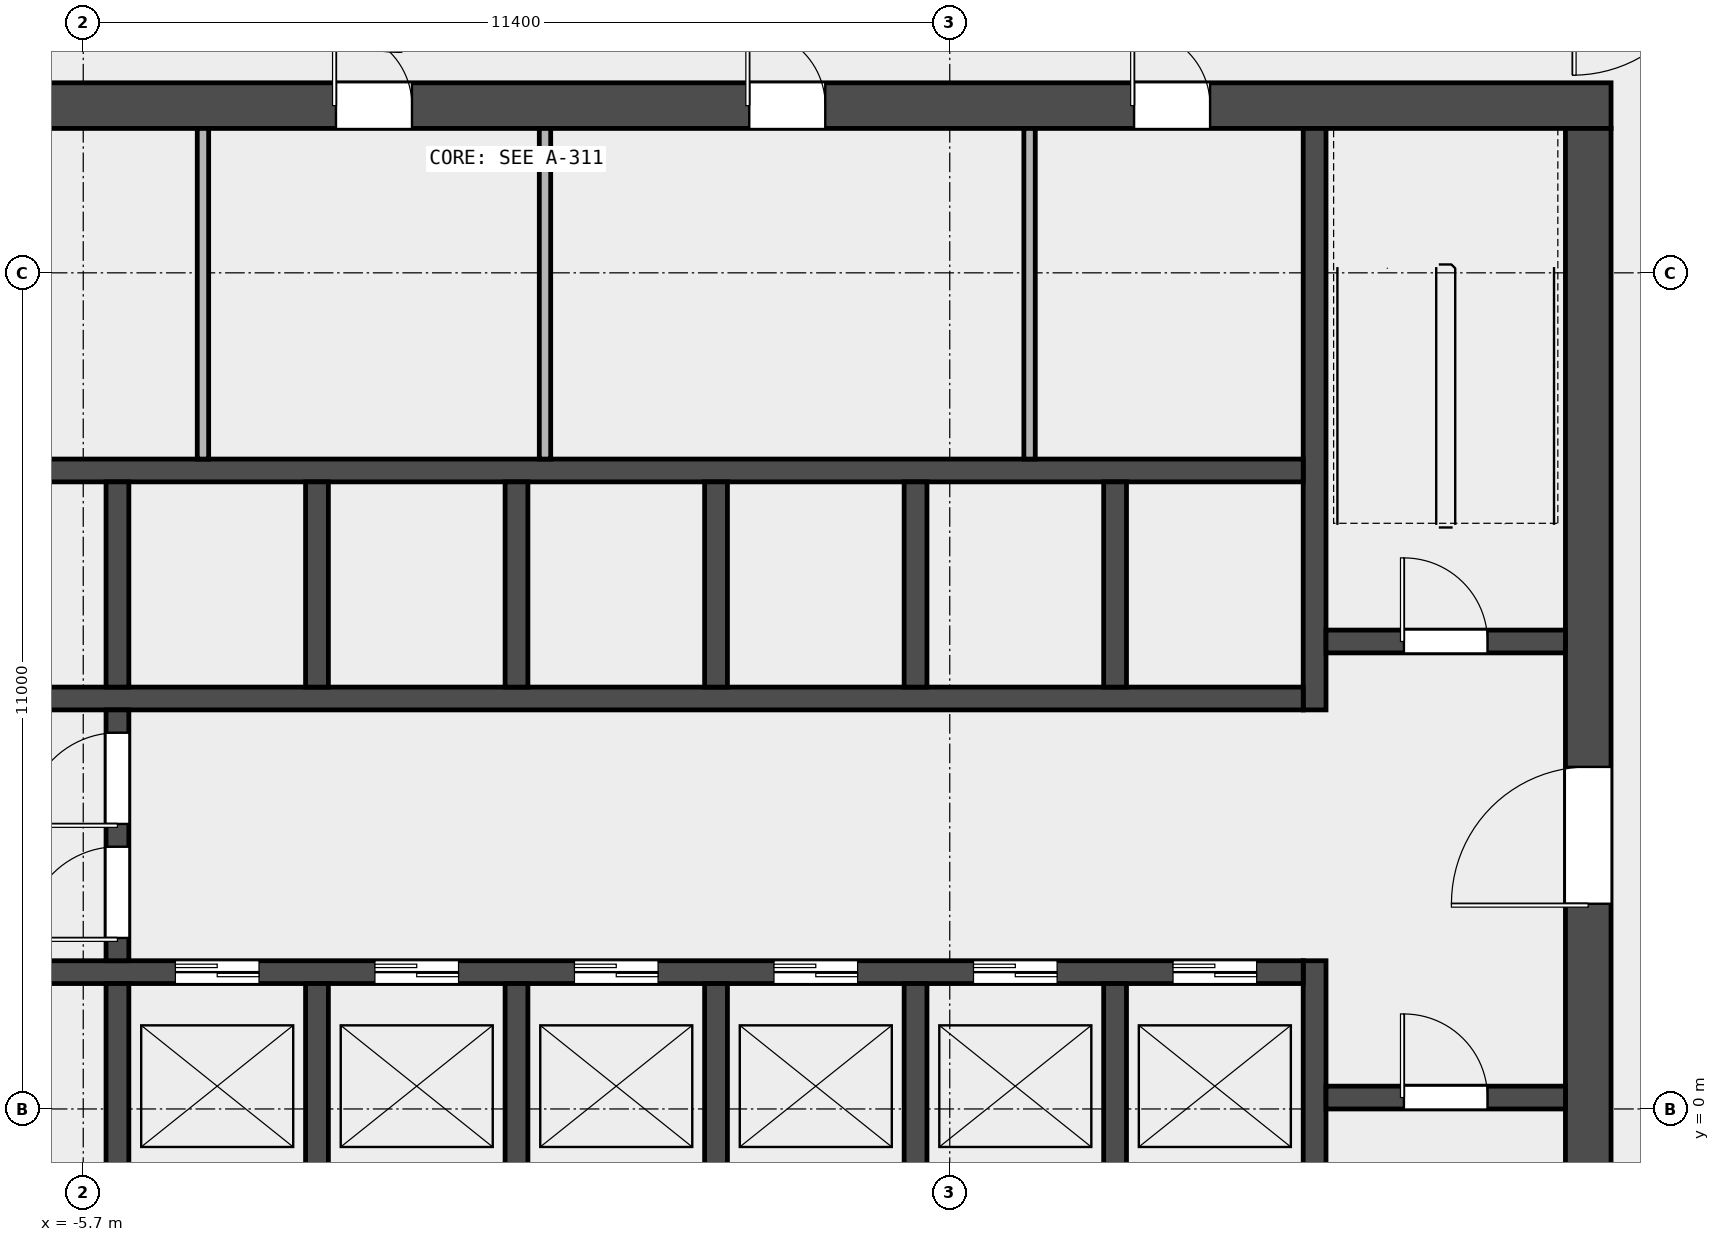
"""IFC4 building model, lengths in metres.
Left out: names, types, materials, properties, quantities, classifications, styles, units other than length and angle.
Written with IfcOpenShell. Run it as: python <this file> out.ifc"""

import sys

from ifc_helpers import new_model, si_unit, direction, frame, frame_2d, origin, place, context, subcontext, project, spatial, rectangle, extrude, element, fill, save


model = new_model("IFC4")
c1 = context("Model", 3, precision=1e-05, world=origin(), true_north=direction((0.0, 1.0)))
c2 = subcontext(c1, "Body", "Model", "MODEL_VIEW")
j1 = project(units=[si_unit("LENGTHUNIT", "METRE"), si_unit("PLANEANGLEUNIT", "RADIAN")], contexts=[c1])
p1 = place(None, origin())
s1 = spatial("IfcSite", under=j1, at=p1, CompositionType="ELEMENT")
p2 = place(p1, origin())
s2 = spatial("IfcBuilding", under=s1, at=p2, CompositionType="ELEMENT")
p3 = place(p2, frame((0.0, 0.0, 126.1)))
s3 = spatial("IfcBuildingStorey", under=s2, at=p3, CompositionType="ELEMENT", Elevation=126.1)
p4 = place(p3, frame((-14.4, 13.2, 0.0), z_axis=(0.0, 0.0, 1.0), x_axis=(1.0, 0.0, 0.0)))
e1 = element("IfcWall", 1, at=p4, inside=s3, PredefinedType="SHEAR", context=c2, shape_type="SweptSolid", body=[
    extrude(rectangle(XDim=28.8, YDim=0.6, at=frame_2d((14.4, 0.0))), origin(), (0.0, 0.0, 1.0), 4.2),
])
p5 = place(p4, frame((6.587, 0.0, 0.0)))
e2 = element("IfcOpeningElement", 2, at=p5, cuts=e1, PredefinedType="OPENING", context=c2, shape_type="SweptSolid", body=[
    extrude(rectangle(XDim=1.0, YDim=2.1, at=frame_2d((0.5, 1.05))), frame((0.0, 0.312, 0.0), z_axis=(0.0, -1.0, 0.0), x_axis=(1.0, 0.0, 0.0)), (0.0, 0.0, 1.0), 0.624),
])
p6 = place(p4, frame((12.025, 0.0, 0.0)))
e3 = element("IfcOpeningElement", 3, at=p6, cuts=e1, PredefinedType="OPENING", context=c2, shape_type="SweptSolid", body=[
    extrude(rectangle(XDim=1.0, YDim=2.1, at=frame_2d((0.5, 1.05))), frame((0.0, 0.312, 0.0), z_axis=(0.0, -1.0, 0.0), x_axis=(1.0, 0.0, 0.0)), (0.0, 0.0, 1.0), 0.624),
])
p7 = place(p4, frame((17.462, 0.0, 0.0)))
e4 = element("IfcOpeningElement", 4, at=p7, cuts=e1, PredefinedType="OPENING", context=c2, shape_type="SweptSolid", body=[
    extrude(rectangle(XDim=1.0, YDim=2.1, at=frame_2d((0.5, 1.05))), frame((0.0, 0.312, 0.0), z_axis=(0.0, -1.0, 0.0), x_axis=(1.0, 0.0, 0.0)), (0.0, 0.0, 1.0), 0.624),
])
p8 = place(p4, frame((22.525, 0.0, 0.0)))
e5 = element("IfcOpeningElement", 5, at=p8, cuts=e1, PredefinedType="OPENING", context=c2, shape_type="SweptSolid", body=[
    extrude(rectangle(XDim=1.0, YDim=2.1, at=frame_2d((0.5, 1.05))), frame((0.0, 0.312, 0.0), z_axis=(0.0, -1.0, 0.0), x_axis=(1.0, 0.0, 0.0)), (0.0, 0.0, 1.0), 0.624),
])
p9 = place(p3, frame((14.1, -6.6, 0.0), z_axis=(0.0, 0.0, 1.0), x_axis=(0.0, 1.0, 0.0)))
e6 = element("IfcWall", 6, at=p9, inside=s3, PredefinedType="SHEAR", context=c2, shape_type="SweptSolid", body=[
    extrude(rectangle(XDim=19.5, YDim=0.6, at=frame_2d((9.75, 0.0))), origin(), (0.0, 0.0, 1.0), 4.2),
])
p10 = place(p9, frame((9.3, 0.0, 0.0)))
e7 = element("IfcOpeningElement", 7, at=p10, cuts=e6, PredefinedType="OPENING", context=c2, shape_type="SweptSolid", body=[
    extrude(rectangle(XDim=1.8, YDim=2.1, at=frame_2d((0.9, 1.05))), frame((0.0, 0.312, 0.0), z_axis=(0.0, -1.0, 0.0), x_axis=(1.0, 0.0, 0.0)), (0.0, 0.0, 1.0), 0.624),
])
p11 = place(p3, frame((10.5, -6.6, 0.0), z_axis=(0.0, 0.0, 1.0), x_axis=(0.0, 1.0, 0.0)))
e8 = element("IfcWall", 8, at=p11, inside=s3, PredefinedType="SHEAR", context=c2, shape_type="SweptSolid", body=[
    extrude(rectangle(XDim=8.55, YDim=0.3, at=frame_2d((4.275, 0.0))), origin(), (0.0, 0.0, 1.0), 4.2),
])
p12 = place(p3, frame((10.5, 5.25, 0.0), z_axis=(0.0, 0.0, 1.0), x_axis=(0.0, 1.0, 0.0)))
e9 = element("IfcWall", 9, at=p12, inside=s3, PredefinedType="SHEAR", context=c2, shape_type="SweptSolid", body=[
    extrude(rectangle(XDim=7.65, YDim=0.3, at=frame_2d((3.825, 0.0))), origin(), (0.0, 0.0, 1.0), 4.2),
])
p13 = place(p3, frame((10.65, 0.15, 0.0), z_axis=(0.0, 0.0, 1.0), x_axis=(1.0, 0.0, 0.0)))
e10 = element("IfcWall", 10, at=p13, inside=s3, PredefinedType="SOLIDWALL", context=c2, shape_type="SweptSolid", body=[
    extrude(rectangle(XDim=3.15, YDim=0.3, at=frame_2d((1.575, 0.0))), origin(), (0.0, 0.0, 1.0), 4.2),
])
p14 = place(p13, frame((1.025, 0.0, 0.0)))
e11 = element("IfcOpeningElement", 11, at=p14, cuts=e10, PredefinedType="OPENING", context=c2, shape_type="SweptSolid", body=[
    extrude(rectangle(XDim=1.1, YDim=2.1, at=frame_2d((0.55, 1.05))), frame((0.0, 0.162, 0.0), z_axis=(0.0, -1.0, 0.0), x_axis=(1.0, 0.0, 0.0)), (0.0, 0.0, 1.0), 0.324),
])
p15 = place(p3, frame((10.65, 6.15, 0.0), z_axis=(0.0, 0.0, 1.0), x_axis=(1.0, 0.0, 0.0)))
e12 = element("IfcWall", 12, at=p15, inside=s3, PredefinedType="SOLIDWALL", context=c2, shape_type="SweptSolid", body=[
    extrude(rectangle(XDim=3.15, YDim=0.3, at=frame_2d((1.575, 0.0))), origin(), (0.0, 0.0, 1.0), 4.2),
])
p16 = place(p15, frame((1.025, 0.0, 0.0)))
e13 = element("IfcOpeningElement", 13, at=p16, cuts=e12, PredefinedType="OPENING", context=c2, shape_type="SweptSolid", body=[
    extrude(rectangle(XDim=1.1, YDim=2.1, at=frame_2d((0.55, 1.05))), frame((0.0, 0.162, 0.0), z_axis=(0.0, -1.0, 0.0), x_axis=(1.0, 0.0, 0.0)), (0.0, 0.0, 1.0), 0.324),
])
p17 = place(p3, frame((-10.35, 1.8, 0.0), z_axis=(0.0, 0.0, 1.0), x_axis=(1.0, 0.0, 0.0)))
e14 = element("IfcWall", 14, at=p17, inside=s3, PredefinedType="SOLIDWALL", context=c2, shape_type="SweptSolid", body=[
    extrude(rectangle(XDim=20.7, YDim=0.3, at=frame_2d((10.35, 0.0))), origin(), (0.0, 0.0, 1.0), 4.2),
])
p18 = place(p17, frame((0.512, 0.0, 0.0)))
e15 = element("IfcOpeningElement", 15, at=p18, cuts=e14, PredefinedType="OPENING", context=c2, shape_type="SweptSolid", body=[
    extrude(rectangle(XDim=1.3, YDim=2.1, at=frame_2d((0.65, 1.05))), frame((0.0, 0.162, 0.0), z_axis=(0.0, -1.0, 0.0), x_axis=(1.0, 0.0, 0.0)), (0.0, 0.0, 1.0), 0.324),
])
p19 = place(p17, frame((5.863, 0.0, 0.0)))
e16 = element("IfcOpeningElement", 16, at=p19, cuts=e14, PredefinedType="OPENING", context=c2, shape_type="SweptSolid", body=[
    extrude(rectangle(XDim=1.1, YDim=2.1, at=frame_2d((0.55, 1.05))), frame((0.0, 0.162, 0.0), z_axis=(0.0, -1.0, 0.0), x_axis=(1.0, 0.0, 0.0)), (0.0, 0.0, 1.0), 0.324),
])
p20 = place(p17, frame((8.488, 0.0, 0.0)))
e17 = element("IfcOpeningElement", 17, at=p20, cuts=e14, PredefinedType="OPENING", context=c2, shape_type="SweptSolid", body=[
    extrude(rectangle(XDim=1.1, YDim=2.1, at=frame_2d((0.55, 1.05))), frame((0.0, 0.162, 0.0), z_axis=(0.0, -1.0, 0.0), x_axis=(1.0, 0.0, 0.0)), (0.0, 0.0, 1.0), 0.324),
])
p21 = place(p17, frame((11.113, 0.0, 0.0)))
e18 = element("IfcOpeningElement", 18, at=p21, cuts=e14, PredefinedType="OPENING", context=c2, shape_type="SweptSolid", body=[
    extrude(rectangle(XDim=1.1, YDim=2.1, at=frame_2d((0.55, 1.05))), frame((0.0, 0.162, 0.0), z_axis=(0.0, -1.0, 0.0), x_axis=(1.0, 0.0, 0.0)), (0.0, 0.0, 1.0), 0.324),
])
p22 = place(p17, frame((13.738, 0.0, 0.0)))
e19 = element("IfcOpeningElement", 19, at=p22, cuts=e14, PredefinedType="OPENING", context=c2, shape_type="SweptSolid", body=[
    extrude(rectangle(XDim=1.1, YDim=2.1, at=frame_2d((0.55, 1.05))), frame((0.0, 0.162, 0.0), z_axis=(0.0, -1.0, 0.0), x_axis=(1.0, 0.0, 0.0)), (0.0, 0.0, 1.0), 0.324),
])
p23 = place(p17, frame((16.363, 0.0, 0.0)))
e20 = element("IfcOpeningElement", 20, at=p23, cuts=e14, PredefinedType="OPENING", context=c2, shape_type="SweptSolid", body=[
    extrude(rectangle(XDim=1.1, YDim=2.1, at=frame_2d((0.55, 1.05))), frame((0.0, 0.162, 0.0), z_axis=(0.0, -1.0, 0.0), x_axis=(1.0, 0.0, 0.0)), (0.0, 0.0, 1.0), 0.324),
])
p24 = place(p17, frame((18.988, 0.0, 0.0)))
e21 = element("IfcOpeningElement", 21, at=p24, cuts=e14, PredefinedType="OPENING", context=c2, shape_type="SweptSolid", body=[
    extrude(rectangle(XDim=1.1, YDim=2.1, at=frame_2d((0.55, 1.05))), frame((0.0, 0.162, 0.0), z_axis=(0.0, -1.0, 0.0), x_axis=(1.0, 0.0, 0.0)), (0.0, 0.0, 1.0), 0.324),
])
p25 = place(p3, frame((-10.35, 5.4, 0.0), z_axis=(0.0, 0.0, 1.0), x_axis=(1.0, 0.0, 0.0)))
e22 = element("IfcWall", 22, at=p25, inside=s3, PredefinedType="SOLIDWALL", context=c2, shape_type="SweptSolid", body=[
    extrude(rectangle(XDim=20.7, YDim=0.3, at=frame_2d((10.35, 0.0))), origin(), (0.0, 0.0, 1.0), 4.2),
])
p26 = place(p25, frame((0.512, 0.0, 0.0)))
e23 = element("IfcOpeningElement", 23, at=p26, cuts=e22, PredefinedType="OPENING", context=c2, shape_type="SweptSolid", body=[
    extrude(rectangle(XDim=1.3, YDim=2.1, at=frame_2d((0.65, 1.05))), frame((0.0, 0.162, 0.0), z_axis=(0.0, -1.0, 0.0), x_axis=(1.0, 0.0, 0.0)), (0.0, 0.0, 1.0), 0.324),
])
p27 = place(p3, frame((-10.35, 8.4, 0.0), z_axis=(0.0, 0.0, 1.0), x_axis=(1.0, 0.0, 0.0)))
e24 = element("IfcWall", 24, at=p27, inside=s3, PredefinedType="SOLIDWALL", context=c2, shape_type="SweptSolid", body=[
    extrude(rectangle(XDim=20.7, YDim=0.3, at=frame_2d((10.35, 0.0))), origin(), (0.0, 0.0, 1.0), 4.2),
])
for number, where, z_axis, x_axis in (
    (25, (-5.25, -1.05, 0.0), (0.0, 0.0, 1.0), (0.0, 1.0, 0.0)),
    (26, (-2.625, -1.05, 0.0), (0.0, 0.0, 1.0), (0.0, 1.0, 0.0)),
    (27, (0.0, -1.05, 0.0), (0.0, 0.0, 1.0), (0.0, 1.0, 0.0)),
    (28, (2.625, -1.05, 0.0), (0.0, 0.0, 1.0), (0.0, 1.0, 0.0)),
    (29, (5.25, -1.05, 0.0), (0.0, 0.0, 1.0), (0.0, 1.0, 0.0)),
    (30, (7.875, -1.05, 0.0), (0.0, 0.0, 1.0), (0.0, 1.0, 0.0)),
    (31, (-5.25, 5.55, 0.0), (0.0, 0.0, 1.0), (0.0, 1.0, 0.0)),
    (32, (-2.625, 5.55, 0.0), (0.0, 0.0, 1.0), (0.0, 1.0, 0.0)),
    (33, (0.0, 5.55, 0.0), (0.0, 0.0, 1.0), (0.0, 1.0, 0.0)),
    (34, (2.625, 5.55, 0.0), (0.0, 0.0, 1.0), (0.0, 1.0, 0.0)),
    (35, (5.25, 5.55, 0.0), (0.0, 0.0, 1.0), (0.0, 1.0, 0.0)),
    (36, (7.875, 5.55, 0.0), (0.0, 0.0, 1.0), (0.0, 1.0, 0.0)),
):
    element("IfcWall", number, at=place(p3, frame(where, z_axis=z_axis, x_axis=x_axis)), inside=s3, PredefinedType="SOLIDWALL", context=c2, shape_type="SweptSolid", body=[
        extrude(rectangle(XDim=2.7, YDim=0.3, at=frame_2d((1.35, 0.0))), origin(), (0.0, 0.0, 1.0), 4.2),
    ])
p28 = place(p3, frame((-5.25, 1.95, 0.0), z_axis=(0.0, 0.0, 1.0), x_axis=(0.0, 1.0, 0.0)))
e37 = element("IfcWall", 37, at=p28, inside=s3, PredefinedType="SOLIDWALL", context=c2, shape_type="SweptSolid", body=[
    extrude(rectangle(XDim=3.3, YDim=0.3, at=frame_2d((1.65, 0.0))), origin(), (0.0, 0.0, 1.0), 4.2),
])
p29 = place(p28, frame((0.3, 0.0, 0.0)))
e38 = element("IfcOpeningElement", 38, at=p29, cuts=e37, PredefinedType="OPENING", context=c2, shape_type="SweptSolid", body=[
    extrude(rectangle(XDim=1.2, YDim=2.1, at=frame_2d((0.6, 1.05))), frame((0.0, 0.162, 0.0), z_axis=(0.0, -1.0, 0.0), x_axis=(1.0, 0.0, 0.0)), (0.0, 0.0, 1.0), 0.324),
])
p30 = place(p28, frame((1.8, 0.0, 0.0)))
e39 = element("IfcOpeningElement", 39, at=p30, cuts=e37, PredefinedType="OPENING", context=c2, shape_type="SweptSolid", body=[
    extrude(rectangle(XDim=1.2, YDim=2.1, at=frame_2d((0.6, 1.05))), frame((0.0, 0.162, 0.0), z_axis=(0.0, -1.0, 0.0), x_axis=(1.0, 0.0, 0.0)), (0.0, 0.0, 1.0), 0.324),
])
for number, where, z_axis, x_axis in (
    (40, (-4.125, 8.55, 0.0), (0.0, 0.0, 1.0), (0.0, 1.0, 0.0)),
    (41, (0.375, 8.55, 0.0), (0.0, 0.0, 1.0), (0.0, 1.0, 0.0)),
    (42, (6.75, 8.55, 0.0), (0.0, 0.0, 1.0), (0.0, 1.0, 0.0)),
):
    element("IfcWall", number, at=place(p3, frame(where, z_axis=z_axis, x_axis=x_axis)), inside=s3, PredefinedType="PARTITIONING", context=c2, shape_type="SweptSolid", body=[
        extrude(rectangle(XDim=4.35, YDim=0.15, at=frame_2d((2.175, 0.0))), origin(), (0.0, 0.0, 1.0), 4.2),
    ])
p31 = place(p14, origin())
e43 = element("IfcDoor", 43, at=p31, inside=s3, OperationType="SINGLE_SWING_RIGHT", PredefinedType="DOOR", context=c2, shape_type="SweptSolid", body=[
    extrude(rectangle(XDim=1.1, YDim=2.1, at=frame_2d((0.55, 1.05))), frame((0.0, 0.025, 0.0), z_axis=(0.0, -1.0, 0.0), x_axis=(1.0, 0.0, 0.0)), (0.0, 0.0, 1.0), 0.05),
])
fill(e11, e43)
p32 = place(p16, origin())
e44 = element("IfcDoor", 44, at=p32, inside=s3, OperationType="SINGLE_SWING_RIGHT", PredefinedType="DOOR", context=c2, shape_type="SweptSolid", body=[
    extrude(rectangle(XDim=1.1, YDim=2.1, at=frame_2d((0.55, 1.05))), frame((0.0, 0.025, 0.0), z_axis=(0.0, -1.0, 0.0), x_axis=(1.0, 0.0, 0.0)), (0.0, 0.0, 1.0), 0.05),
])
fill(e13, e44)
p33 = place(p10, origin())
e45 = element("IfcDoor", 45, at=p33, inside=s3, OperationType="DOUBLE_DOOR_SINGLE_SWING", PredefinedType="DOOR", context=c2, shape_type="SweptSolid", body=[
    extrude(rectangle(XDim=1.8, YDim=2.1, at=frame_2d((0.9, 1.05))), frame((0.0, 0.025, 0.0), z_axis=(0.0, -1.0, 0.0), x_axis=(1.0, 0.0, 0.0)), (0.0, 0.0, 1.0), 0.05),
])
fill(e7, e45)
p34 = place(p29, origin())
e46 = element("IfcDoor", 46, at=p34, inside=s3, OperationType="SINGLE_SWING_LEFT", PredefinedType="DOOR", context=c2, shape_type="SweptSolid", body=[
    extrude(rectangle(XDim=1.2, YDim=2.1, at=frame_2d((0.6, 1.05))), frame((0.0, 0.025, 0.0), z_axis=(0.0, -1.0, 0.0), x_axis=(1.0, 0.0, 0.0)), (0.0, 0.0, 1.0), 0.05),
])
fill(e38, e46)
p35 = place(p30, origin())
e47 = element("IfcDoor", 47, at=p35, inside=s3, OperationType="SINGLE_SWING_RIGHT", PredefinedType="DOOR", context=c2, shape_type="SweptSolid", body=[
    extrude(rectangle(XDim=1.2, YDim=2.1, at=frame_2d((0.6, 1.05))), frame((0.0, 0.025, 0.0), z_axis=(0.0, -1.0, 0.0), x_axis=(1.0, 0.0, 0.0)), (0.0, 0.0, 1.0), 0.05),
])
fill(e39, e47)
p36 = place(p19, origin())
e48 = element("IfcDoor", 48, at=p36, inside=s3, OperationType="DOUBLE_DOOR_SLIDING", PredefinedType="DOOR", context=c2, shape_type="SweptSolid", body=[
    extrude(rectangle(XDim=1.1, YDim=2.1, at=frame_2d((0.55, 1.05))), frame((0.0, 0.025, 0.0), z_axis=(0.0, -1.0, 0.0), x_axis=(1.0, 0.0, 0.0)), (0.0, 0.0, 1.0), 0.05),
])
fill(e16, e48)
p37 = place(p20, origin())
e49 = element("IfcDoor", 49, at=p37, inside=s3, OperationType="DOUBLE_DOOR_SLIDING", PredefinedType="DOOR", context=c2, shape_type="SweptSolid", body=[
    extrude(rectangle(XDim=1.1, YDim=2.1, at=frame_2d((0.55, 1.05))), frame((0.0, 0.025, 0.0), z_axis=(0.0, -1.0, 0.0), x_axis=(1.0, 0.0, 0.0)), (0.0, 0.0, 1.0), 0.05),
])
fill(e17, e49)
p38 = place(p21, origin())
e50 = element("IfcDoor", 50, at=p38, inside=s3, OperationType="DOUBLE_DOOR_SLIDING", PredefinedType="DOOR", context=c2, shape_type="SweptSolid", body=[
    extrude(rectangle(XDim=1.1, YDim=2.1, at=frame_2d((0.55, 1.05))), frame((0.0, 0.025, 0.0), z_axis=(0.0, -1.0, 0.0), x_axis=(1.0, 0.0, 0.0)), (0.0, 0.0, 1.0), 0.05),
])
fill(e18, e50)
p39 = place(p22, origin())
e51 = element("IfcDoor", 51, at=p39, inside=s3, OperationType="DOUBLE_DOOR_SLIDING", PredefinedType="DOOR", context=c2, shape_type="SweptSolid", body=[
    extrude(rectangle(XDim=1.1, YDim=2.1, at=frame_2d((0.55, 1.05))), frame((0.0, 0.025, 0.0), z_axis=(0.0, -1.0, 0.0), x_axis=(1.0, 0.0, 0.0)), (0.0, 0.0, 1.0), 0.05),
])
fill(e19, e51)
p40 = place(p23, origin())
e52 = element("IfcDoor", 52, at=p40, inside=s3, OperationType="DOUBLE_DOOR_SLIDING", PredefinedType="DOOR", context=c2, shape_type="SweptSolid", body=[
    extrude(rectangle(XDim=1.1, YDim=2.1, at=frame_2d((0.55, 1.05))), frame((0.0, 0.025, 0.0), z_axis=(0.0, -1.0, 0.0), x_axis=(1.0, 0.0, 0.0)), (0.0, 0.0, 1.0), 0.05),
])
fill(e20, e52)
p41 = place(p24, origin())
e53 = element("IfcDoor", 53, at=p41, inside=s3, OperationType="DOUBLE_DOOR_SLIDING", PredefinedType="DOOR", context=c2, shape_type="SweptSolid", body=[
    extrude(rectangle(XDim=1.1, YDim=2.1, at=frame_2d((0.55, 1.05))), frame((0.0, 0.025, 0.0), z_axis=(0.0, -1.0, 0.0), x_axis=(1.0, 0.0, 0.0)), (0.0, 0.0, 1.0), 0.05),
])
fill(e21, e53)
p42 = place(p6, origin())
e54 = element("IfcDoor", 54, at=p42, inside=s3, OperationType="SINGLE_SWING_LEFT", PredefinedType="DOOR", context=c2, shape_type="SweptSolid", body=[
    extrude(rectangle(XDim=1.0, YDim=2.1, at=frame_2d((0.5, 1.05))), frame((0.0, 0.025, 0.0), z_axis=(0.0, -1.0, 0.0), x_axis=(1.0, 0.0, 0.0)), (0.0, 0.0, 1.0), 0.05),
])
fill(e3, e54)
p43 = place(p7, origin())
e55 = element("IfcDoor", 55, at=p43, inside=s3, OperationType="SINGLE_SWING_LEFT", PredefinedType="DOOR", context=c2, shape_type="SweptSolid", body=[
    extrude(rectangle(XDim=1.0, YDim=2.1, at=frame_2d((0.5, 1.05))), frame((0.0, 0.025, 0.0), z_axis=(0.0, -1.0, 0.0), x_axis=(1.0, 0.0, 0.0)), (0.0, 0.0, 1.0), 0.05),
])
fill(e4, e55)
p44 = place(p8, origin())
e56 = element("IfcDoor", 56, at=p44, inside=s3, OperationType="SINGLE_SWING_LEFT", PredefinedType="DOOR", context=c2, shape_type="SweptSolid", body=[
    extrude(rectangle(XDim=1.0, YDim=2.1, at=frame_2d((0.5, 1.05))), frame((0.0, 0.025, 0.0), z_axis=(0.0, -1.0, 0.0), x_axis=(1.0, 0.0, 0.0)), (0.0, 0.0, 1.0), 0.05),
])
fill(e5, e56)
save(model, sys.argv[1])
